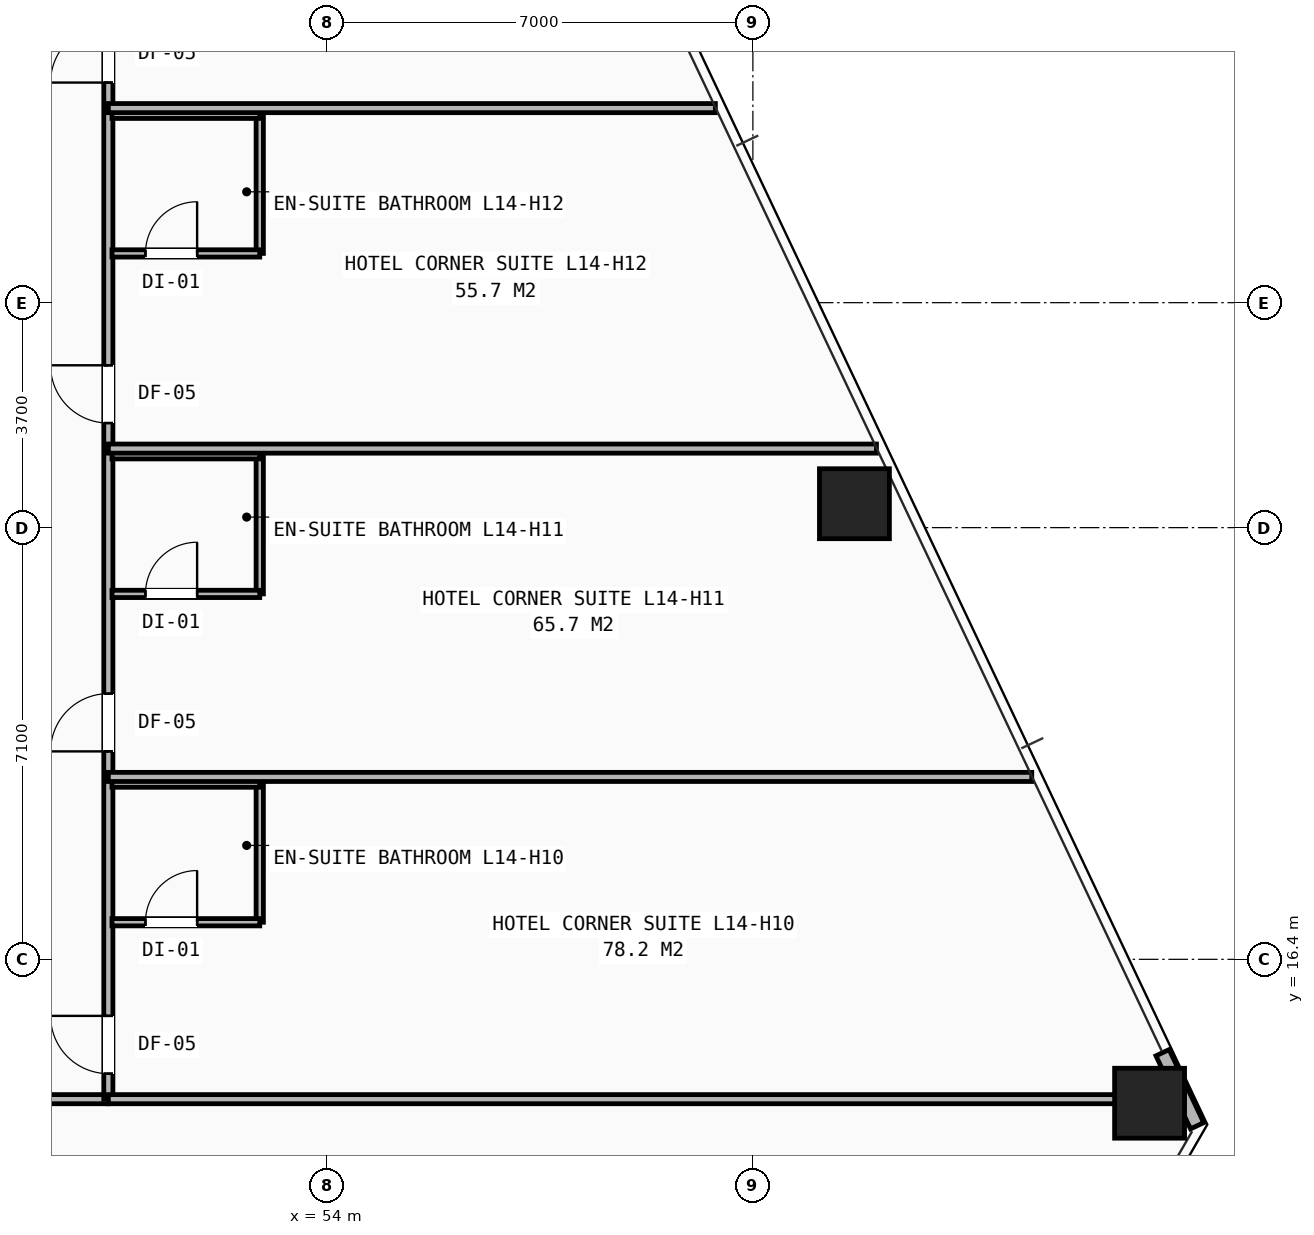
"""IFC4 building model, lengths in metres.
Left out: names, types, materials, properties, quantities, classifications, styles, units other than length and angle.
Written with IfcOpenShell. Run it as: python <this file> out.ifc"""

import sys

from ifc_helpers import new_model, si_unit, direction, frame, frame_2d, origin, origin_2d, place, context, subcontext, project, spatial, rectangle, hollow_rectangle, extrude, element, fill, save


model = new_model("IFC4")
c1 = context("Model", 3, precision=1e-05, world=origin(), true_north=direction((0.0, 1.0)))
c2 = subcontext(c1, "Body", "Model", "MODEL_VIEW")
j1 = project(units=[si_unit("LENGTHUNIT", "METRE"), si_unit("PLANEANGLEUNIT", "RADIAN")], contexts=[c1])
p1 = place(None, origin())
s1 = spatial("IfcSite", under=j1, at=p1, CompositionType="ELEMENT")
p2 = place(p1, origin())
s2 = spatial("IfcBuilding", under=s1, at=p2, CompositionType="ELEMENT")
p3 = place(p2, frame((0.0, 0.0, 52.8)))
s3 = spatial("IfcBuildingStorey", under=s2, at=p3, CompositionType="ELEMENT", Elevation=52.8)
for number, where, z_axis, x_axis in (
    (1, (67.524, 14.033, 0.0), (0.0, 0.0, 1.0), (1.0, 0.0, 0.0)),
    (2, (62.67, 23.893, 0.0), (0.0, 0.0, 1.0), (1.0, 0.0, 0.0)),
):
    element("IfcColumn", number, at=place(p3, frame(where, z_axis=z_axis, x_axis=x_axis)), inside=s3, PredefinedType="COLUMN", context=c2, shape_type="SweptSolid", body=[
        extrude(hollow_rectangle(XDim=1.15, YDim=1.15, WallThickness=0.075, at=origin_2d()), origin(), (0.0, 0.0, 1.0), 3.2),
    ])
p4 = place(p3, frame((68.306, 13.662, 0.0), z_axis=(0.0, 0.0, 1.0), x_axis=(-0.427644283084, 0.903947104175, 0.0)))
e3 = element("IfcWall", 3, at=p4, inside=s3, PredefinedType="SHEAR", context=c2, shape_type="SweptSolid", body=[
    extrude(rectangle(XDim=1.33, YDim=0.24, at=frame_2d((0.665, 0.0))), origin(), (0.0, 0.0, 1.0), 2.263),
])
p5 = place(p3, frame((29.6, 14.1, 0.0), z_axis=(0.0, 0.0, 1.0), x_axis=(1.0, 0.0, 0.0)))
e4 = element("IfcWall", 4, at=p5, inside=s3, PredefinedType="PARTITIONING", context=c2, shape_type="SweptSolid", body=[
    extrude(rectangle(XDim=20.8, YDim=0.15, at=frame_2d((10.4, 0.0))), origin(), (0.0, 0.0, 1.0), 2.191),
])
p6 = place(p5, frame((0.57, 0.0, 0.0)))
e5 = element("IfcOpeningElement", 5, at=p6, cuts=e4, PredefinedType="OPENING", context=c2, shape_type="SweptSolid", body=[
    extrude(rectangle(XDim=0.95, YDim=2.1, at=frame_2d((0.475, 1.05))), frame((0.0, 0.085, 0.0), z_axis=(0.0, -1.0, 0.0), x_axis=(1.0, 0.0, 0.0)), (0.0, 0.0, 1.0), 0.17),
])
p7 = place(p5, frame((4.22, 0.0, 0.0)))
e6 = element("IfcOpeningElement", 6, at=p7, cuts=e4, PredefinedType="OPENING", context=c2, shape_type="SweptSolid", body=[
    extrude(rectangle(XDim=0.95, YDim=2.1, at=frame_2d((0.475, 1.05))), frame((0.0, 0.085, 0.0), z_axis=(0.0, -1.0, 0.0), x_axis=(1.0, 0.0, 0.0)), (0.0, 0.0, 1.0), 0.17),
])
p8 = place(p5, frame((8.42, 0.0, 0.0)))
e7 = element("IfcOpeningElement", 7, at=p8, cuts=e4, PredefinedType="OPENING", context=c2, shape_type="SweptSolid", body=[
    extrude(rectangle(XDim=0.95, YDim=2.1, at=frame_2d((0.475, 1.05))), frame((0.0, 0.085, 0.0), z_axis=(0.0, -1.0, 0.0), x_axis=(1.0, 0.0, 0.0)), (0.0, 0.0, 1.0), 0.17),
])
p9 = place(p5, frame((12.62, 0.0, 0.0)))
e8 = element("IfcOpeningElement", 8, at=p9, cuts=e4, PredefinedType="OPENING", context=c2, shape_type="SweptSolid", body=[
    extrude(rectangle(XDim=0.95, YDim=2.1, at=frame_2d((0.475, 1.05))), frame((0.0, 0.085, 0.0), z_axis=(0.0, -1.0, 0.0), x_axis=(1.0, 0.0, 0.0)), (0.0, 0.0, 1.0), 0.17),
])
p10 = place(p5, frame((17.02, 0.0, 0.0)))
e9 = element("IfcOpeningElement", 9, at=p10, cuts=e4, PredefinedType="OPENING", context=c2, shape_type="SweptSolid", body=[
    extrude(rectangle(XDim=0.95, YDim=2.1, at=frame_2d((0.475, 1.05))), frame((0.0, 0.085, 0.0), z_axis=(0.0, -1.0, 0.0), x_axis=(1.0, 0.0, 0.0)), (0.0, 0.0, 1.0), 0.17),
])
p11 = place(p3, frame((50.4, 14.1, 0.0), z_axis=(0.0, 0.0, 1.0), x_axis=(0.0, 1.0, 0.0)))
e10 = element("IfcWall", 10, at=p11, inside=s3, PredefinedType="PARTITIONING", context=c2, shape_type="SweptSolid", body=[
    extrude(rectangle(XDim=21.9, YDim=0.15, at=frame_2d((10.95, 0.0))), origin(), (0.0, 0.0, 1.0), 2.191),
])
p12 = place(p11, frame((0.42, 0.0, 0.0)))
e11 = element("IfcOpeningElement", 11, at=p12, cuts=e10, PredefinedType="OPENING", context=c2, shape_type="SweptSolid", body=[
    extrude(rectangle(XDim=0.95, YDim=2.1, at=frame_2d((0.475, 1.05))), frame((0.0, 0.085, 0.0), z_axis=(0.0, -1.0, 0.0), x_axis=(1.0, 0.0, 0.0)), (0.0, 0.0, 1.0), 0.17),
])
p13 = place(p11, frame((5.72, 0.0, 0.0)))
e12 = element("IfcOpeningElement", 12, at=p13, cuts=e10, PredefinedType="OPENING", context=c2, shape_type="SweptSolid", body=[
    extrude(rectangle(XDim=0.95, YDim=2.1, at=frame_2d((0.475, 1.05))), frame((0.0, 0.085, 0.0), z_axis=(0.0, -1.0, 0.0), x_axis=(1.0, 0.0, 0.0)), (0.0, 0.0, 1.0), 0.17),
])
p14 = place(p11, frame((11.12, 0.0, 0.0)))
e13 = element("IfcOpeningElement", 13, at=p14, cuts=e10, PredefinedType="OPENING", context=c2, shape_type="SweptSolid", body=[
    extrude(rectangle(XDim=0.95, YDim=2.1, at=frame_2d((0.475, 1.05))), frame((0.0, 0.085, 0.0), z_axis=(0.0, -1.0, 0.0), x_axis=(1.0, 0.0, 0.0)), (0.0, 0.0, 1.0), 0.17),
])
p15 = place(p11, frame((16.72, 0.0, 0.0)))
e14 = element("IfcOpeningElement", 14, at=p15, cuts=e10, PredefinedType="OPENING", context=c2, shape_type="SweptSolid", body=[
    extrude(rectangle(XDim=0.95, YDim=2.1, at=frame_2d((0.475, 1.05))), frame((0.0, 0.085, 0.0), z_axis=(0.0, -1.0, 0.0), x_axis=(1.0, 0.0, 0.0)), (0.0, 0.0, 1.0), 0.17),
])
p16 = place(p3, frame((50.4, 14.1, 0.0), z_axis=(0.0, 0.0, 1.0), x_axis=(1.0, 0.0, 0.0)))
e15 = element("IfcWall", 15, at=p16, inside=s3, PredefinedType="PARTITIONING", context=c2, shape_type="SweptSolid", body=[
    extrude(rectangle(XDim=17.694, YDim=0.15, at=frame_2d((8.847, 0.0))), origin(), (0.0, 0.0, 1.0), 2.191),
])
p17 = place(p3, frame((52.89, 17.01, 0.0), z_axis=(0.0, 0.0, 1.0), x_axis=(0.0, 1.0, 0.0)))
e16 = element("IfcWall", 16, at=p17, inside=s3, PredefinedType="PARTITIONING", context=c2, shape_type="SweptSolid", body=[
    extrude(rectangle(XDim=2.28, YDim=0.12, at=frame_2d((1.14, 0.0))), origin(), (0.0, 0.0, 1.0), 2.98),
])
p18 = place(p3, frame((50.46, 17.01, 0.0), z_axis=(0.0, 0.0, 1.0), x_axis=(1.0, 0.0, 0.0)))
e17 = element("IfcWall", 17, at=p18, inside=s3, PredefinedType="PARTITIONING", context=c2, shape_type="SweptSolid", body=[
    extrude(rectangle(XDim=2.43, YDim=0.12, at=frame_2d((1.215, 0.0))), origin(), (0.0, 0.0, 1.0), 2.98),
])
p19 = place(p18, frame((0.55, 0.0, 0.0)))
e18 = element("IfcOpeningElement", 18, at=p19, cuts=e17, PredefinedType="OPENING", context=c2, shape_type="SweptSolid", body=[
    extrude(rectangle(XDim=0.85, YDim=2.05, at=frame_2d((0.425, 1.025))), frame((0.0, 0.07, 0.0), z_axis=(0.0, -1.0, 0.0), x_axis=(1.0, 0.0, 0.0)), (0.0, 0.0, 1.0), 0.14),
])
p20 = place(p3, frame((50.46, 19.29, 0.0), z_axis=(0.0, 0.0, 1.0), x_axis=(1.0, 0.0, 0.0)))
e19 = element("IfcWall", 19, at=p20, inside=s3, PredefinedType="PARTITIONING", context=c2, shape_type="SweptSolid", body=[
    extrude(rectangle(XDim=2.43, YDim=0.12, at=frame_2d((1.215, 0.0))), origin(), (0.0, 0.0, 1.0), 2.98),
])
p21 = place(p3, frame((50.4, 19.4, 0.0), z_axis=(0.0, 0.0, 1.0), x_axis=(1.0, 0.0, 0.0)))
e20 = element("IfcWall", 20, at=p21, inside=s3, PredefinedType="PARTITIONING", context=c2, shape_type="SweptSolid", body=[
    extrude(rectangle(XDim=15.186, YDim=0.15, at=frame_2d((7.593, 0.0))), origin(), (0.0, 0.0, 1.0), 2.268),
])
p22 = place(p3, frame((52.89, 22.41, 0.0), z_axis=(0.0, 0.0, 1.0), x_axis=(0.0, 1.0, 0.0)))
e21 = element("IfcWall", 21, at=p22, inside=s3, PredefinedType="PARTITIONING", context=c2, shape_type="SweptSolid", body=[
    extrude(rectangle(XDim=2.28, YDim=0.12, at=frame_2d((1.14, 0.0))), origin(), (0.0, 0.0, 1.0), 2.98),
])
p23 = place(p3, frame((50.46, 22.41, 0.0), z_axis=(0.0, 0.0, 1.0), x_axis=(1.0, 0.0, 0.0)))
e22 = element("IfcWall", 22, at=p23, inside=s3, PredefinedType="PARTITIONING", context=c2, shape_type="SweptSolid", body=[
    extrude(rectangle(XDim=2.43, YDim=0.12, at=frame_2d((1.215, 0.0))), origin(), (0.0, 0.0, 1.0), 2.98),
])
p24 = place(p23, frame((0.55, 0.0, 0.0)))
e23 = element("IfcOpeningElement", 23, at=p24, cuts=e22, PredefinedType="OPENING", context=c2, shape_type="SweptSolid", body=[
    extrude(rectangle(XDim=0.85, YDim=2.05, at=frame_2d((0.425, 1.025))), frame((0.0, 0.07, 0.0), z_axis=(0.0, -1.0, 0.0), x_axis=(1.0, 0.0, 0.0)), (0.0, 0.0, 1.0), 0.14),
])
p25 = place(p3, frame((50.46, 24.69, 0.0), z_axis=(0.0, 0.0, 1.0), x_axis=(1.0, 0.0, 0.0)))
e24 = element("IfcWall", 24, at=p25, inside=s3, PredefinedType="PARTITIONING", context=c2, shape_type="SweptSolid", body=[
    extrude(rectangle(XDim=2.43, YDim=0.12, at=frame_2d((1.215, 0.0))), origin(), (0.0, 0.0, 1.0), 2.98),
])
p26 = place(p3, frame((50.4, 24.8, 0.0), z_axis=(0.0, 0.0, 1.0), x_axis=(1.0, 0.0, 0.0)))
e25 = element("IfcWall", 25, at=p26, inside=s3, PredefinedType="PARTITIONING", context=c2, shape_type="SweptSolid", body=[
    extrude(rectangle(XDim=12.632, YDim=0.15, at=frame_2d((6.316, 0.0))), origin(), (0.0, 0.0, 1.0), 2.268),
])
p27 = place(p3, frame((52.89, 28.01, 0.0), z_axis=(0.0, 0.0, 1.0), x_axis=(0.0, 1.0, 0.0)))
e26 = element("IfcWall", 26, at=p27, inside=s3, PredefinedType="PARTITIONING", context=c2, shape_type="SweptSolid", body=[
    extrude(rectangle(XDim=2.28, YDim=0.12, at=frame_2d((1.14, 0.0))), origin(), (0.0, 0.0, 1.0), 2.98),
])
p28 = place(p3, frame((50.46, 28.01, 0.0), z_axis=(0.0, 0.0, 1.0), x_axis=(1.0, 0.0, 0.0)))
e27 = element("IfcWall", 27, at=p28, inside=s3, PredefinedType="PARTITIONING", context=c2, shape_type="SweptSolid", body=[
    extrude(rectangle(XDim=2.43, YDim=0.12, at=frame_2d((1.215, 0.0))), origin(), (0.0, 0.0, 1.0), 2.98),
])
p29 = place(p28, frame((0.55, 0.0, 0.0)))
e28 = element("IfcOpeningElement", 28, at=p29, cuts=e27, PredefinedType="OPENING", context=c2, shape_type="SweptSolid", body=[
    extrude(rectangle(XDim=0.85, YDim=2.05, at=frame_2d((0.425, 1.025))), frame((0.0, 0.07, 0.0), z_axis=(0.0, -1.0, 0.0), x_axis=(1.0, 0.0, 0.0)), (0.0, 0.0, 1.0), 0.14),
])
p30 = place(p3, frame((50.46, 30.29, 0.0), z_axis=(0.0, 0.0, 1.0), x_axis=(1.0, 0.0, 0.0)))
e29 = element("IfcWall", 29, at=p30, inside=s3, PredefinedType="PARTITIONING", context=c2, shape_type="SweptSolid", body=[
    extrude(rectangle(XDim=2.43, YDim=0.12, at=frame_2d((1.215, 0.0))), origin(), (0.0, 0.0, 1.0), 2.98),
])
p31 = place(p3, frame((50.4, 30.4, 0.0), z_axis=(0.0, 0.0, 1.0), x_axis=(1.0, 0.0, 0.0)))
e30 = element("IfcWall", 30, at=p31, inside=s3, PredefinedType="PARTITIONING", context=c2, shape_type="SweptSolid", body=[
    extrude(rectangle(XDim=9.983, YDim=0.15, at=frame_2d((4.992, 0.0))), origin(), (0.0, 0.0, 1.0), 2.268),
])
p32 = place(p12, origin())
e31 = element("IfcDoor", 31, at=p32, inside=s3, OperationType="SINGLE_SWING_RIGHT", PredefinedType="DOOR", context=c2, shape_type="SweptSolid", body=[
    extrude(rectangle(XDim=0.95, YDim=2.1, at=frame_2d((0.475, 1.05))), frame((0.0, 0.025, 0.0), z_axis=(0.0, -1.0, 0.0), x_axis=(1.0, 0.0, 0.0)), (0.0, 0.0, 1.0), 0.05),
])
fill(e11, e31)
p33 = place(p19, origin())
e32 = element("IfcDoor", 32, at=p33, inside=s3, OperationType="SINGLE_SWING_RIGHT", PredefinedType="DOOR", context=c2, shape_type="SweptSolid", body=[
    extrude(rectangle(XDim=0.85, YDim=2.05, at=frame_2d((0.425, 1.025))), frame((0.0, 0.025, 0.0), z_axis=(0.0, -1.0, 0.0), x_axis=(1.0, 0.0, 0.0)), (0.0, 0.0, 1.0), 0.05),
])
fill(e18, e32)
p34 = place(p13, origin())
e33 = element("IfcDoor", 33, at=p34, inside=s3, OperationType="SINGLE_SWING_LEFT", PredefinedType="DOOR", context=c2, shape_type="SweptSolid", body=[
    extrude(rectangle(XDim=0.95, YDim=2.1, at=frame_2d((0.475, 1.05))), frame((0.0, 0.025, 0.0), z_axis=(0.0, -1.0, 0.0), x_axis=(1.0, 0.0, 0.0)), (0.0, 0.0, 1.0), 0.05),
])
fill(e12, e33)
p35 = place(p24, origin())
e34 = element("IfcDoor", 34, at=p35, inside=s3, OperationType="SINGLE_SWING_RIGHT", PredefinedType="DOOR", context=c2, shape_type="SweptSolid", body=[
    extrude(rectangle(XDim=0.85, YDim=2.05, at=frame_2d((0.425, 1.025))), frame((0.0, 0.025, 0.0), z_axis=(0.0, -1.0, 0.0), x_axis=(1.0, 0.0, 0.0)), (0.0, 0.0, 1.0), 0.05),
])
fill(e23, e34)
p36 = place(p14, origin())
e35 = element("IfcDoor", 35, at=p36, inside=s3, OperationType="SINGLE_SWING_RIGHT", PredefinedType="DOOR", context=c2, shape_type="SweptSolid", body=[
    extrude(rectangle(XDim=0.95, YDim=2.1, at=frame_2d((0.475, 1.05))), frame((0.0, 0.025, 0.0), z_axis=(0.0, -1.0, 0.0), x_axis=(1.0, 0.0, 0.0)), (0.0, 0.0, 1.0), 0.05),
])
fill(e13, e35)
p37 = place(p29, origin())
e36 = element("IfcDoor", 36, at=p37, inside=s3, OperationType="SINGLE_SWING_RIGHT", PredefinedType="DOOR", context=c2, shape_type="SweptSolid", body=[
    extrude(rectangle(XDim=0.85, YDim=2.05, at=frame_2d((0.425, 1.025))), frame((0.0, 0.025, 0.0), z_axis=(0.0, -1.0, 0.0), x_axis=(1.0, 0.0, 0.0)), (0.0, 0.0, 1.0), 0.05),
])
fill(e28, e36)
p38 = place(p15, origin())
e37 = element("IfcDoor", 37, at=p38, inside=s3, OperationType="SINGLE_SWING_LEFT", PredefinedType="DOOR", context=c2, shape_type="SweptSolid", body=[
    extrude(rectangle(XDim=0.95, YDim=2.1, at=frame_2d((0.475, 1.05))), frame((0.0, 0.025, 0.0), z_axis=(0.0, -1.0, 0.0), x_axis=(1.0, 0.0, 0.0)), (0.0, 0.0, 1.0), 0.05),
])
fill(e14, e37)
save(model, sys.argv[1])
